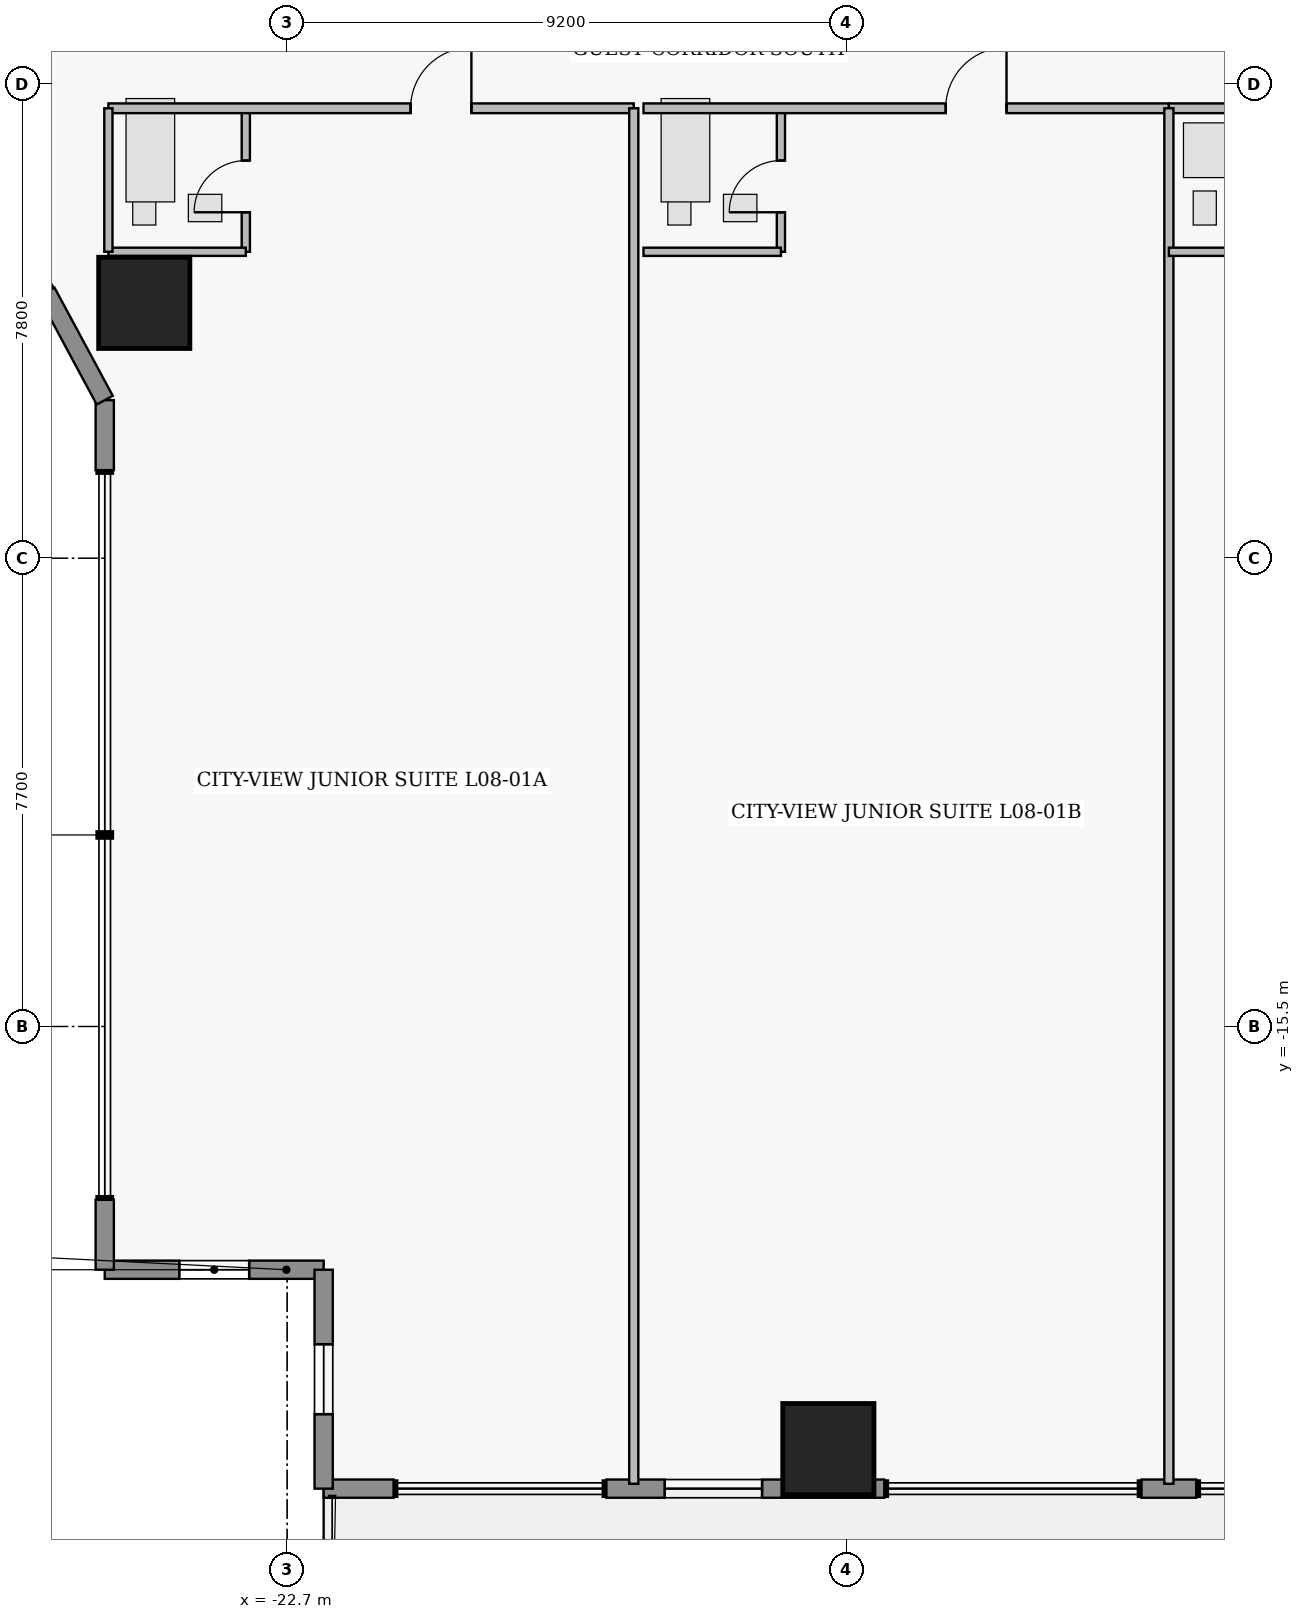
"""IFC4 building model, lengths in metres.
Left out: names, types, materials, properties, quantities, classifications, styles, units other than length and angle.
Written with IfcOpenShell. Run it as: python <this file> out.ifc"""

import sys

from ifc_helpers import new_model, si_unit, direction, frame, frame_2d, origin, origin_2d, place, context, subcontext, project, spatial, rectangle, extrude, element, fill, save


model = new_model("IFC4")
c1 = context("Model", 3, precision=1e-05, world=origin(), true_north=direction((0.0, 1.0)))
c2 = subcontext(c1, "Body", "Model", "MODEL_VIEW")
j1 = project(units=[si_unit("LENGTHUNIT", "METRE"), si_unit("PLANEANGLEUNIT", "RADIAN")], contexts=[c1])
p1 = place(None, origin())
s1 = spatial("IfcSite", under=j1, at=p1, CompositionType="ELEMENT")
p2 = place(p1, origin())
s2 = spatial("IfcBuilding", under=s1, at=p2, CompositionType="ELEMENT")
p3 = place(p2, frame((0.0, 0.0, 38.55)))
s3 = spatial("IfcBuildingStorey", under=s2, at=p3, CompositionType="ELEMENT", Elevation=38.55)
for number, where, z_axis, x_axis in (
    (1, (-13.8, -22.45, 0.0), (0.0, 0.0, 1.0), (1.0, 0.0, 0.0)),
    (2, (-25.05, -3.6, 0.0), (0.0, 0.0, 1.0), (1.0, 0.0, 0.0)),
):
    element("IfcColumn", number, at=place(p3, frame(where, z_axis=z_axis, x_axis=x_axis)), inside=s3, PredefinedType="COLUMN", context=c2, shape_type="SweptSolid", body=[
        extrude(rectangle(XDim=1.5, YDim=1.5, at=origin_2d()), origin(), (0.0, 0.0, 1.0), 3.65),
    ])
p4 = place(p3, frame((-22.1, -19.5, 0.0), z_axis=(0.0, 0.0, 1.0), x_axis=(-1.0, 0.0, 0.0)))
e3 = element("IfcWall", 3, at=p4, inside=s3, PredefinedType="STANDARD", context=c2, shape_type="SweptSolid", body=[
    extrude(rectangle(XDim=3.6, YDim=0.3, at=frame_2d((1.8, 0.0))), origin(), (0.0, 0.0, 1.0), 3.43),
])
p5 = place(p4, frame((1.225, 0.0, 1.25)))
e4 = element("IfcOpeningElement", 4, at=p5, cuts=e3, PredefinedType="OPENING", context=c2, shape_type="SweptSolid", body=[
    extrude(rectangle(XDim=1.15, YDim=1.55, at=frame_2d((0.575, 0.775))), frame((0.0, 0.16, 0.0), z_axis=(0.0, -1.0, 0.0), x_axis=(1.0, 0.0, 0.0)), (0.0, 0.0, 1.0), 0.32),
])
p6 = place(p3, frame((-25.7, -19.5, 0.0), z_axis=(0.0, 0.0, 1.0), x_axis=(0.0, 1.0, 0.0)))
e5 = element("IfcWall", 5, at=p6, inside=s3, PredefinedType="STANDARD", context=c2, shape_type="SweptSolid", body=[
    extrude(rectangle(XDim=1.15, YDim=0.3, at=frame_2d((0.575, 0.0))), origin(), (0.0, 0.0, 1.0), 3.43),
])
p7 = place(p3, frame((-25.7, -6.35, 0.0), z_axis=(0.0, 0.0, 1.0), x_axis=(0.0, 1.0, 0.0)))
e6 = element("IfcWall", 6, at=p7, inside=s3, PredefinedType="STANDARD", context=c2, shape_type="SweptSolid", body=[
    extrude(rectangle(XDim=1.15, YDim=0.3, at=frame_2d((0.575, 0.0))), origin(), (0.0, 0.0, 1.0), 3.43),
])
p8 = place(p3, frame((-25.7, -5.2, 0.0), z_axis=(0.0, 0.0, 1.0), x_axis=(-0.474121438562, 0.88045946045, 0.0)))
e7 = element("IfcWall", 7, at=p8, inside=s3, PredefinedType="STANDARD", context=c2, shape_type="SweptSolid", body=[
    extrude(rectangle(XDim=2.021, YDim=0.3, at=frame_2d((1.01, 0.0))), origin(), (0.0, 0.0, 1.0), 3.43),
])
p9 = place(p3, frame((-28.5, 0.0, 0.0), z_axis=(0.0, 0.0, 1.0), x_axis=(0.474109683532, 0.880465790352, 0.0)))
e8 = element("IfcWall", 8, at=p9, inside=s3, PredefinedType="STANDARD", context=c2, shape_type="SweptSolid", body=[
    extrude(rectangle(XDim=5.906, YDim=0.3, at=frame_2d((2.953, 0.0))), origin(), (0.0, 0.0, 1.0), 3.43),
])
p10 = place(p9, frame((2.432, 0.0, 0.95)))
e9 = element("IfcOpeningElement", 9, at=p10, cuts=e8, PredefinedType="OPENING", context=c2, shape_type="SweptSolid", body=[
    extrude(rectangle(XDim=1.15, YDim=1.55, at=frame_2d((0.575, 0.775))), frame((0.0, 0.16, 0.0), z_axis=(0.0, -1.0, 0.0), x_axis=(1.0, 0.0, 0.0)), (0.0, 0.0, 1.0), 0.32),
])
p11 = place(p3, frame((-7.75, -23.1, 0.0), z_axis=(0.0, 0.0, 1.0), x_axis=(-1.0, 0.0, 0.0)))
e10 = element("IfcWall", 10, at=p11, inside=s3, PredefinedType="STANDARD", context=c2, shape_type="SweptSolid", body=[
    extrude(rectangle(XDim=0.9, YDim=0.3, at=frame_2d((0.45, 0.0))), origin(), (0.0, 0.0, 1.0), 3.43),
])
p12 = place(p3, frame((-12.88, -23.1, 0.0), z_axis=(0.0, 0.0, 1.0), x_axis=(-1.0, 0.0, 0.0)))
e11 = element("IfcWall", 11, at=p12, inside=s3, PredefinedType="STANDARD", context=c2, shape_type="SweptSolid", body=[
    extrude(rectangle(XDim=4.57, YDim=0.3, at=frame_2d((2.285, 0.0))), origin(), (0.0, 0.0, 1.0), 3.43),
])
p13 = place(p12, frame((2.01, 0.0, 0.85)))
e12 = element("IfcOpeningElement", 12, at=p13, cuts=e11, PredefinedType="OPENING", context=c2, shape_type="SweptSolid", body=[
    extrude(rectangle(XDim=1.6, YDim=1.8, at=frame_2d((0.8, 0.9))), frame((0.0, 0.16, 0.0), z_axis=(0.0, -1.0, 0.0), x_axis=(1.0, 0.0, 0.0)), (0.0, 0.0, 1.0), 0.32),
])
p14 = place(p3, frame((-20.95, -23.1, 0.0), z_axis=(0.0, 0.0, 1.0), x_axis=(-1.0, 0.0, 0.0)))
e13 = element("IfcWall", 13, at=p14, inside=s3, PredefinedType="STANDARD", context=c2, shape_type="SweptSolid", body=[
    extrude(rectangle(XDim=1.15, YDim=0.3, at=frame_2d((0.575, 0.0))), origin(), (0.0, 0.0, 1.0), 3.43),
])
p15 = place(p3, frame((-22.1, -23.1, 0.0), z_axis=(0.0, 0.0, 1.0), x_axis=(0.0, 1.0, 0.0)))
e14 = element("IfcWall", 14, at=p15, inside=s3, PredefinedType="STANDARD", context=c2, shape_type="SweptSolid", body=[
    extrude(rectangle(XDim=3.6, YDim=0.3, at=frame_2d((1.8, 0.0))), origin(), (0.0, 0.0, 1.0), 3.43),
])
p16 = place(p15, frame((1.225, 0.0, 1.25)))
e15 = element("IfcOpeningElement", 15, at=p16, cuts=e14, PredefinedType="OPENING", context=c2, shape_type="SweptSolid", body=[
    extrude(rectangle(XDim=1.15, YDim=1.55, at=frame_2d((0.575, 0.775))), frame((0.0, 0.16, 0.0), z_axis=(0.0, -1.0, 0.0), x_axis=(1.0, 0.0, 0.0)), (0.0, 0.0, 1.0), 0.32),
])
p17 = place(p3, frame((-23.38, -2.76, 0.0), z_axis=(0.0, 0.0, 1.0), x_axis=(0.0, 1.0, 0.0)))
e16 = element("IfcWall", 16, at=p17, inside=s3, PredefinedType="PLUMBINGWALL", context=c2, shape_type="SweptSolid", body=[
    extrude(rectangle(XDim=2.36, YDim=0.135, at=frame_2d((1.18, 0.0))), origin(), (0.0, 0.0, 1.0), 3.43),
])
p18 = place(p17, frame((0.65, 0.0, 0.0)))
e17 = element("IfcOpeningElement", 17, at=p18, cuts=e16, PredefinedType="OPENING", context=c2, shape_type="SweptSolid", body=[
    extrude(rectangle(XDim=0.85, YDim=2.1, at=frame_2d((0.425, 1.05))), frame((0.0, 0.077, 0.0), z_axis=(0.0, -1.0, 0.0), x_axis=(1.0, 0.0, 0.0)), (0.0, 0.0, 1.0), 0.155),
])
p19 = place(p3, frame((-25.64, -0.4, 0.0), z_axis=(0.0, 0.0, 1.0), x_axis=(1.0, 0.0, 0.0)))
e18 = element("IfcWall", 18, at=p19, inside=s3, PredefinedType="PARTITIONING", context=c2, shape_type="SweptSolid", body=[
    extrude(rectangle(XDim=8.64, YDim=0.16, at=frame_2d((4.32, 0.0))), origin(), (0.0, 0.0, 1.0), 3.43),
])
p20 = place(p19, frame((4.97, 0.0, 0.0)))
e19 = element("IfcOpeningElement", 19, at=p20, cuts=e18, PredefinedType="OPENING", context=c2, shape_type="SweptSolid", body=[
    extrude(rectangle(XDim=1.0, YDim=2.15, at=frame_2d((0.5, 1.075))), frame((0.0, 0.09, 0.0), z_axis=(0.0, -1.0, 0.0), x_axis=(1.0, 0.0, 0.0)), (0.0, 0.0, 1.0), 0.18),
])
p21 = place(p3, frame((-14.58, -2.76, 0.0), z_axis=(0.0, 0.0, 1.0), x_axis=(0.0, 1.0, 0.0)))
e20 = element("IfcWall", 20, at=p21, inside=s3, PredefinedType="PLUMBINGWALL", context=c2, shape_type="SweptSolid", body=[
    extrude(rectangle(XDim=2.36, YDim=0.135, at=frame_2d((1.18, 0.0))), origin(), (0.0, 0.0, 1.0), 3.43),
])
p22 = place(p21, frame((0.65, 0.0, 0.0)))
e21 = element("IfcOpeningElement", 21, at=p22, cuts=e20, PredefinedType="OPENING", context=c2, shape_type="SweptSolid", body=[
    extrude(rectangle(XDim=0.85, YDim=2.1, at=frame_2d((0.425, 1.05))), frame((0.0, 0.077, 0.0), z_axis=(0.0, -1.0, 0.0), x_axis=(1.0, 0.0, 0.0)), (0.0, 0.0, 1.0), 0.155),
])
p23 = place(p3, frame((-16.84, -0.4, 0.0), z_axis=(0.0, 0.0, 1.0), x_axis=(1.0, 0.0, 0.0)))
e22 = element("IfcWall", 22, at=p23, inside=s3, PredefinedType="PARTITIONING", context=c2, shape_type="SweptSolid", body=[
    extrude(rectangle(XDim=8.64, YDim=0.16, at=frame_2d((4.32, 0.0))), origin(), (0.0, 0.0, 1.0), 3.43),
])
p24 = place(p23, frame((4.97, 0.0, 0.0)))
e23 = element("IfcOpeningElement", 23, at=p24, cuts=e22, PredefinedType="OPENING", context=c2, shape_type="SweptSolid", body=[
    extrude(rectangle(XDim=1.0, YDim=2.15, at=frame_2d((0.5, 1.075))), frame((0.0, 0.09, 0.0), z_axis=(0.0, -1.0, 0.0), x_axis=(1.0, 0.0, 0.0)), (0.0, 0.0, 1.0), 0.18),
])
p25 = place(p3, frame((-8.2, -0.4, 0.0), z_axis=(0.0, 0.0, 1.0), x_axis=(1.0, 0.0, 0.0)))
e24 = element("IfcWall", 24, at=p25, inside=s3, PredefinedType="PARTITIONING", context=c2, shape_type="SweptSolid", body=[
    extrude(rectangle(XDim=5.22, YDim=0.16, at=frame_2d((2.61, 0.0))), origin(), (0.0, 0.0, 1.0), 3.43),
])
p26 = place(p25, frame((3.26, 0.0, 0.0)))
e25 = element("IfcOpeningElement", 25, at=p26, cuts=e24, PredefinedType="OPENING", context=c2, shape_type="SweptSolid", body=[
    extrude(rectangle(XDim=1.0, YDim=2.15, at=frame_2d((0.5, 1.075))), frame((0.0, 0.09, 0.0), z_axis=(0.0, -1.0, 0.0), x_axis=(1.0, 0.0, 0.0)), (0.0, 0.0, 1.0), 0.18),
])
p27 = place(p3, frame((-25.64, -2.76, 0.0), z_axis=(0.0, 0.0, 1.0), x_axis=(1.0, 0.0, 0.0)))
e26 = element("IfcWall", 26, at=p27, inside=s3, PredefinedType="PLUMBINGWALL", context=c2, shape_type="SweptSolid", body=[
    extrude(rectangle(XDim=2.26, YDim=0.135, at=frame_2d((1.13, 0.0))), origin(), (0.0, 0.0, 1.0), 3.43),
])
p28 = place(p3, frame((-25.64, -2.76, 0.0), z_axis=(0.0, 0.0, 1.0), x_axis=(0.0, 1.0, 0.0)))
e27 = element("IfcWall", 27, at=p28, inside=s3, PredefinedType="PLUMBINGWALL", context=c2, shape_type="SweptSolid", body=[
    extrude(rectangle(XDim=2.36, YDim=0.135, at=frame_2d((1.18, 0.0))), origin(), (0.0, 0.0, 1.0), 3.43),
])
p29 = place(p3, frame((-17.0, -23.02, 0.0), z_axis=(0.0, 0.0, 1.0), x_axis=(0.0, 1.0, 0.0)))
e28 = element("IfcWall", 28, at=p29, inside=s3, PredefinedType="PARTITIONING", context=c2, shape_type="SweptSolid", body=[
    extrude(rectangle(XDim=22.62, YDim=0.15, at=frame_2d((11.31, 0.0))), origin(), (0.0, 0.0, 1.0), 3.43),
])
p30 = place(p3, frame((-16.84, -2.76, 0.0), z_axis=(0.0, 0.0, 1.0), x_axis=(1.0, 0.0, 0.0)))
e29 = element("IfcWall", 29, at=p30, inside=s3, PredefinedType="PLUMBINGWALL", context=c2, shape_type="SweptSolid", body=[
    extrude(rectangle(XDim=2.26, YDim=0.135, at=frame_2d((1.13, 0.0))), origin(), (0.0, 0.0, 1.0), 3.43),
])
p31 = place(p3, frame((-8.2, -23.02, 0.0), z_axis=(0.0, 0.0, 1.0), x_axis=(0.0, 1.0, 0.0)))
e30 = element("IfcWall", 30, at=p31, inside=s3, PredefinedType="PARTITIONING", context=c2, shape_type="SweptSolid", body=[
    extrude(rectangle(XDim=22.62, YDim=0.15, at=frame_2d((11.31, 0.0))), origin(), (0.0, 0.0, 1.0), 3.43),
])
p32 = place(p3, frame((-8.2, -2.76, 0.0), z_axis=(0.0, 0.0, 1.0), x_axis=(1.0, 0.0, 0.0)))
e31 = element("IfcWall", 31, at=p32, inside=s3, PredefinedType="PLUMBINGWALL", context=c2, shape_type="SweptSolid", body=[
    extrude(rectangle(XDim=2.26, YDim=0.135, at=frame_2d((1.13, 0.0))), origin(), (0.0, 0.0, 1.0), 3.43),
])
p33 = place(p5, origin())
e32 = element("IfcWindow", 32, at=p33, inside=s3, PartitioningType="SINGLE_PANEL", PredefinedType="WINDOW", context=c2, shape_type="SweptSolid", body=[
    extrude(rectangle(XDim=1.15, YDim=1.55, at=frame_2d((0.575, 0.775))), frame((0.0, 0.03, 0.0), z_axis=(0.0, -1.0, 0.0), x_axis=(1.0, 0.0, 0.0)), (0.0, 0.0, 1.0), 0.06),
])
fill(e4, e32)
p34 = place(p13, origin())
e33 = element("IfcWindow", 33, at=p34, inside=s3, PartitioningType="SINGLE_PANEL", PredefinedType="WINDOW", context=c2, shape_type="SweptSolid", body=[
    extrude(rectangle(XDim=1.6, YDim=1.8, at=frame_2d((0.8, 0.9))), frame((0.0, 0.03, 0.0), z_axis=(0.0, -1.0, 0.0), x_axis=(1.0, 0.0, 0.0)), (0.0, 0.0, 1.0), 0.06),
])
fill(e12, e33)
p35 = place(p16, origin())
e34 = element("IfcWindow", 34, at=p35, inside=s3, PartitioningType="SINGLE_PANEL", PredefinedType="WINDOW", context=c2, shape_type="SweptSolid", body=[
    extrude(rectangle(XDim=1.15, YDim=1.55, at=frame_2d((0.575, 0.775))), frame((0.0, 0.03, 0.0), z_axis=(0.0, -1.0, 0.0), x_axis=(1.0, 0.0, 0.0)), (0.0, 0.0, 1.0), 0.06),
])
fill(e15, e34)
p36 = place(p18, origin())
e35 = element("IfcDoor", 35, at=p36, inside=s3, OperationType="SINGLE_SWING_LEFT", PredefinedType="DOOR", context=c2, shape_type="SweptSolid", body=[
    extrude(rectangle(XDim=0.85, YDim=2.1, at=frame_2d((0.425, 1.05))), frame((0.0, 0.025, 0.0), z_axis=(0.0, -1.0, 0.0), x_axis=(1.0, 0.0, 0.0)), (0.0, 0.0, 1.0), 0.05),
])
fill(e17, e35)
p37 = place(p20, origin())
e36 = element("IfcDoor", 36, at=p37, inside=s3, OperationType="SINGLE_SWING_RIGHT", PredefinedType="DOOR", context=c2, shape_type="SweptSolid", body=[
    extrude(rectangle(XDim=1.0, YDim=2.15, at=frame_2d((0.5, 1.075))), frame((0.0, 0.025, 0.0), z_axis=(0.0, -1.0, 0.0), x_axis=(1.0, 0.0, 0.0)), (0.0, 0.0, 1.0), 0.05),
])
fill(e19, e36)
p38 = place(p22, origin())
e37 = element("IfcDoor", 37, at=p38, inside=s3, OperationType="SINGLE_SWING_LEFT", PredefinedType="DOOR", context=c2, shape_type="SweptSolid", body=[
    extrude(rectangle(XDim=0.85, YDim=2.1, at=frame_2d((0.425, 1.05))), frame((0.0, 0.025, 0.0), z_axis=(0.0, -1.0, 0.0), x_axis=(1.0, 0.0, 0.0)), (0.0, 0.0, 1.0), 0.05),
])
fill(e21, e37)
p39 = place(p24, origin())
e38 = element("IfcDoor", 38, at=p39, inside=s3, OperationType="SINGLE_SWING_RIGHT", PredefinedType="DOOR", context=c2, shape_type="SweptSolid", body=[
    extrude(rectangle(XDim=1.0, YDim=2.15, at=frame_2d((0.5, 1.075))), frame((0.0, 0.025, 0.0), z_axis=(0.0, -1.0, 0.0), x_axis=(1.0, 0.0, 0.0)), (0.0, 0.0, 1.0), 0.05),
])
fill(e23, e38)
save(model, sys.argv[1])
